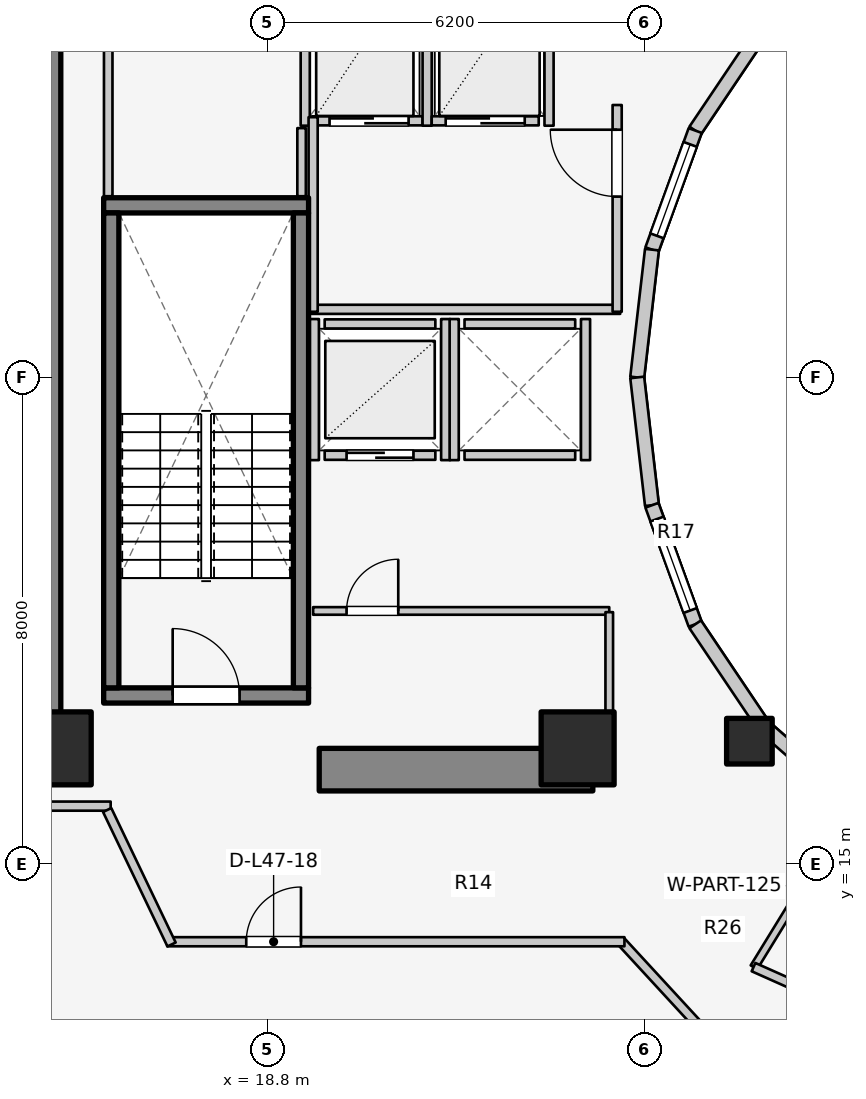
"""IFC4 building model, lengths in metres.
Left out: names, types, materials, properties, quantities, classifications, styles, units other than length and angle.
Written with IfcOpenShell. Run it as: python <this file> out.ifc"""

import sys

from ifc_helpers import new_model, si_unit, direction, frame, frame_2d, origin, origin_2d, place, context, subcontext, project, spatial, rectangle, extrude, element, fill, save


model = new_model("IFC4")
c1 = context("Model", 3, precision=1e-05, world=origin(), true_north=direction((0.0, 1.0)))
c2 = subcontext(c1, "Body", "Model", "MODEL_VIEW")
j1 = project(units=[si_unit("LENGTHUNIT", "METRE"), si_unit("PLANEANGLEUNIT", "RADIAN")], contexts=[c1])
p1 = place(None, origin())
s1 = spatial("IfcSite", under=j1, at=p1, CompositionType="ELEMENT")
p2 = place(p1, origin())
s2 = spatial("IfcBuilding", under=s1, at=p2, CompositionType="ELEMENT")
p3 = place(p2, frame((0.0, 0.0, 156.0)))
s3 = spatial("IfcBuildingStorey", under=s2, at=p3, CompositionType="ELEMENT", Elevation=156.0)
p4 = place(p3, frame((15.05, 17.05, 0.0), z_axis=(0.0, 0.0, 1.0), x_axis=(0.0, 1.0, 0.0)))
e1 = element("IfcWall", 1, at=p4, inside=s3, PredefinedType="SHEAR", context=c2, shape_type="SweptSolid", body=[
    extrude(rectangle(XDim=12.8, YDim=0.7, at=frame_2d((6.4, 0.0))), origin(), (0.0, 0.0, 1.0), 3.1),
])
p5 = place(p3, frame((19.65, 16.55, 0.0), z_axis=(0.0, 0.0, 1.0), x_axis=(1.0, 0.0, 0.0)))
e2 = element("IfcWall", 2, at=p5, inside=s3, PredefinedType="SHEAR", context=c2, shape_type="SweptSolid", body=[
    extrude(rectangle(XDim=4.5, YDim=0.7, at=frame_2d((2.25, 0.0))), origin(), (0.0, 0.0, 1.0), 3.1),
])
p6 = place(p3, frame((16.105, 17.77, 0.0), z_axis=(0.0, 0.0, 1.0), x_axis=(1.0, 0.0, 0.0)))
e3 = element("IfcWall", 3, at=p6, inside=s3, PredefinedType="SOLIDWALL", context=c2, shape_type="SweptSolid", body=[
    extrude(rectangle(XDim=3.37, YDim=0.25, at=frame_2d((1.685, 0.0))), origin(), (0.0, 0.0, 1.0), 3.1),
])
p7 = place(p6, frame((1.135, 0.0, 0.0)))
e4 = element("IfcOpeningElement", 4, at=p7, cuts=e3, PredefinedType="OPENING", context=c2, shape_type="SweptSolid", body=[
    extrude(rectangle(XDim=1.1, YDim=2.1, at=frame_2d((0.55, 1.05))), frame((0.0, 0.135, 0.0), z_axis=(0.0, -1.0, 0.0), x_axis=(1.0, 0.0, 0.0)), (0.0, 0.0, 1.0), 0.27),
])
p8 = place(p3, frame((16.105, 25.83, 0.0), z_axis=(0.0, 0.0, 1.0), x_axis=(1.0, 0.0, 0.0)))
e5 = element("IfcWall", 5, at=p8, inside=s3, PredefinedType="SOLIDWALL", context=c2, shape_type="SweptSolid", body=[
    extrude(rectangle(XDim=3.37, YDim=0.25, at=frame_2d((1.685, 0.0))), origin(), (0.0, 0.0, 1.0), 3.1),
])
for number, where, z_axis, x_axis in (
    (6, (16.23, 17.895, 0.0), (0.0, 0.0, 1.0), (0.0, 1.0, 0.0)),
    (7, (19.35, 17.895, 0.0), (0.0, 0.0, 1.0), (0.0, 1.0, 0.0)),
):
    element("IfcWall", number, at=place(p3, frame(where, z_axis=z_axis, x_axis=x_axis)), inside=s3, PredefinedType="SOLIDWALL", context=c2, shape_type="SweptSolid", body=[
        extrude(rectangle(XDim=7.81, YDim=0.25, at=frame_2d((3.905, 0.0))), origin(), (0.0, 0.0, 1.0), 3.1),
    ])
for number, where, z_axis, x_axis in (
    (8, (15.3, 16.9, 0.0), (0.0, 0.0, 1.0), (1.0, 0.0, 0.0)),
    (9, (23.9, 16.9, 0.0), (0.0, 0.0, 1.0), (1.0, 0.0, 0.0)),
):
    element("IfcColumn", number, at=place(p3, frame(where, z_axis=z_axis, x_axis=x_axis)), inside=s3, PredefinedType="COLUMN", context=c2, shape_type="SweptSolid", body=[
        extrude(rectangle(XDim=1.2, YDim=1.2, at=origin_2d()), origin(), (0.0, 0.0, 1.0), 3.1),
    ])
p9 = place(p3, frame((26.725, 17.018, 0.0), z_axis=(0.0, 0.0, 1.0), x_axis=(1.0, 0.0, 0.0)))
e10 = element("IfcColumn", 10, at=p9, inside=s3, PredefinedType="COLUMN", context=c2, shape_type="SweptSolid", body=[
    extrude(rectangle(XDim=0.75, YDim=0.75, at=origin_2d()), origin(), (0.0, 0.0, 1.0), 3.1),
])
p10 = place(p3, frame((26.965, 28.742, 0.0), z_axis=(0.0, 0.0, 1.0), x_axis=(-0.558197800898, -0.829707909492, 0.0)))
e11 = element("IfcWall", 11, at=p10, inside=s3, PredefinedType="STANDARD", context=c2, shape_type="SweptSolid", body=[
    extrude(rectangle(XDim=2.027, YDim=0.23, at=frame_2d((1.013, 0.0))), origin(), (0.0, 0.0, 1.0), 2.16),
])
p11 = place(p3, frame((25.834, 27.06, 0.0), z_axis=(0.0, 0.0, 1.0), x_axis=(-0.341423187295, -0.93990968033, 0.0)))
e12 = element("IfcWall", 12, at=p11, inside=s3, PredefinedType="STANDARD", context=c2, shape_type="SweptSolid", body=[
    extrude(rectangle(XDim=2.084, YDim=0.23, at=frame_2d((1.042, 0.0))), origin(), (0.0, 0.0, 1.0), 2.84),
])
p12 = place(p11, frame((0.242, 0.0, 0.85)))
e13 = element("IfcOpeningElement", 13, at=p12, cuts=e12, PredefinedType="OPENING", context=c2, shape_type="SweptSolid", body=[
    extrude(rectangle(XDim=1.6, YDim=1.65, at=frame_2d((0.8, 0.825))), frame((0.0, 0.125, 0.0), z_axis=(0.0, -1.0, 0.0), x_axis=(1.0, 0.0, 0.0)), (0.0, 0.0, 1.0), 0.25),
])
for number, where, z_axis, x_axis in (
    (14, (25.123, 25.102, 0.0), (0.0, 0.0, 1.0), (-0.115, -0.993, 0.0)),
    (15, (24.88, 23.0, 0.0), (0.0, 0.0, 1.0), (0.115, -0.993, 0.0)),
):
    element("IfcWall", number, at=place(p3, frame(where, z_axis=z_axis, x_axis=x_axis)), inside=s3, PredefinedType="STANDARD", context=c2, shape_type="SweptSolid", body=[
        extrude(rectangle(XDim=2.115, YDim=0.23, at=frame_2d((1.058, 0.0))), origin(), (0.0, 0.0, 1.0), 2.84),
    ])
p13 = place(p3, frame((25.123, 20.898, 0.0), z_axis=(0.0, 0.0, 1.0), x_axis=(0.341423187295, -0.93990968033, 0.0)))
e16 = element("IfcWall", 16, at=p13, inside=s3, PredefinedType="STANDARD", context=c2, shape_type="SweptSolid", body=[
    extrude(rectangle(XDim=2.084, YDim=0.23, at=frame_2d((1.042, 0.0))), origin(), (0.0, 0.0, 1.0), 2.84),
])
p14 = place(p13, frame((0.242, 0.0, 0.85)))
e17 = element("IfcOpeningElement", 17, at=p14, cuts=e16, PredefinedType="OPENING", context=c2, shape_type="SweptSolid", body=[
    extrude(rectangle(XDim=1.6, YDim=1.65, at=frame_2d((0.8, 0.825))), frame((0.0, 0.125, 0.0), z_axis=(0.0, -1.0, 0.0), x_axis=(1.0, 0.0, 0.0)), (0.0, 0.0, 1.0), 0.25),
])
p15 = place(p3, frame((25.834, 18.94, 0.0), z_axis=(0.0, 0.0, 1.0), x_axis=(0.558197800898, -0.829707909492, 0.0)))
e18 = element("IfcWall", 18, at=p15, inside=s3, PredefinedType="STANDARD", context=c2, shape_type="SweptSolid", body=[
    extrude(rectangle(XDim=2.027, YDim=0.23, at=frame_2d((1.013, 0.0))), origin(), (0.0, 0.0, 1.0), 2.16),
])
p16 = place(p3, frame((26.965, 17.258, 0.0), z_axis=(0.0, 0.0, 1.0), x_axis=(0.752576694707, -0.658504607869, 0.0)))
e19 = element("IfcWall", 19, at=p16, inside=s3, PredefinedType="STANDARD", context=c2, shape_type="SweptSolid", body=[
    extrude(rectangle(XDim=1.959, YDim=0.23, at=frame_2d((0.98, 0.0))), origin(), (0.0, 0.0, 1.0), 2.16),
])
p17 = place(p3, frame((12.381, 13.757, 0.0), z_axis=(0.0, 0.0, 1.0), x_axis=(0.790185650662, -0.612867552973, 0.0)))
e20 = element("IfcWall", 20, at=p17, inside=s3, PredefinedType="STANDARD", context=c2, shape_type="SweptSolid", body=[
    extrude(rectangle(XDim=4.239, YDim=0.26, at=frame_2d((2.12, 0.0))), origin(), (0.0, 0.0, 1.0), 2.85),
])
p18 = place(p17, frame((1.37, 0.0, 0.75)))
e21 = element("IfcOpeningElement", 21, at=p18, cuts=e20, PredefinedType="OPENING", context=c2, shape_type="SweptSolid", body=[
    extrude(rectangle(XDim=1.5, YDim=1.6, at=frame_2d((0.75, 0.8))), frame((0.0, 0.14, 0.0), z_axis=(0.0, -1.0, 0.0), x_axis=(1.0, 0.0, 0.0)), (0.0, 0.0, 1.0), 0.28),
])
p19 = place(p3, frame((19.74, 21.72, 0.0), z_axis=(0.0, 0.0, 1.0), x_axis=(1.0, 0.0, 0.0)))
e22 = element("IfcWall", 22, at=p19, inside=s3, PredefinedType="SOLIDWALL", context=c2, shape_type="SweptSolid", body=[
    extrude(rectangle(XDim=1.82, YDim=0.15, at=frame_2d((0.91, 0.0))), origin(), (0.0, 0.0, 1.0), 2.855),
])
p20 = place(p19, frame((0.36, 0.0, 0.0)))
e23 = element("IfcOpeningElement", 23, at=p20, cuts=e22, PredefinedType="OPENING", context=c2, shape_type="SweptSolid", body=[
    extrude(rectangle(XDim=1.1, YDim=2.1, at=frame_2d((0.55, 1.05))), frame((0.0, 0.085, 0.0), z_axis=(0.0, -1.0, 0.0), x_axis=(1.0, 0.0, 0.0)), (0.0, 0.0, 1.0), 0.17),
])
p21 = place(p3, frame((19.74, 23.88, 0.0), z_axis=(0.0, 0.0, 1.0), x_axis=(1.0, 0.0, 0.0)))
e24 = element("IfcWall", 24, at=p21, inside=s3, PredefinedType="SOLIDWALL", context=c2, shape_type="SweptSolid", body=[
    extrude(rectangle(XDim=1.82, YDim=0.15, at=frame_2d((0.91, 0.0))), origin(), (0.0, 0.0, 1.0), 2.855),
])
for number, where, z_axis, x_axis in (
    (25, (19.57, 21.64, 0.0), (0.0, 0.0, 1.0), (0.0, 1.0, 0.0)),
    (26, (21.73, 21.64, 0.0), (0.0, 0.0, 1.0), (0.0, 1.0, 0.0)),
):
    element("IfcWall", number, at=place(p3, frame(where, z_axis=z_axis, x_axis=x_axis)), inside=s3, PredefinedType="SOLIDWALL", context=c2, shape_type="SweptSolid", body=[
        extrude(rectangle(XDim=2.32, YDim=0.15, at=frame_2d((1.16, 0.0))), origin(), (0.0, 0.0, 1.0), 2.855),
    ])
for number, where, z_axis, x_axis in (
    (27, (22.04, 21.72, 0.0), (0.0, 0.0, 1.0), (1.0, 0.0, 0.0)),
    (28, (22.04, 23.88, 0.0), (0.0, 0.0, 1.0), (1.0, 0.0, 0.0)),
):
    element("IfcWall", number, at=place(p3, frame(where, z_axis=z_axis, x_axis=x_axis)), inside=s3, PredefinedType="SOLIDWALL", context=c2, shape_type="SweptSolid", body=[
        extrude(rectangle(XDim=1.82, YDim=0.15, at=frame_2d((0.91, 0.0))), origin(), (0.0, 0.0, 1.0), 2.12),
    ])
p22 = place(p3, frame((21.87, 21.64, 0.0), z_axis=(0.0, 0.0, 1.0), x_axis=(0.0, 1.0, 0.0)))
e29 = element("IfcWall", 29, at=p22, inside=s3, PredefinedType="SOLIDWALL", context=c2, shape_type="SweptSolid", body=[
    extrude(rectangle(XDim=2.32, YDim=0.15, at=frame_2d((1.16, 0.0))), origin(), (0.0, 0.0, 1.0), 2.855),
])
p23 = place(p3, frame((24.03, 21.64, 0.0), z_axis=(0.0, 0.0, 1.0), x_axis=(0.0, 1.0, 0.0)))
e30 = element("IfcWall", 30, at=p23, inside=s3, PredefinedType="SOLIDWALL", context=c2, shape_type="SweptSolid", body=[
    extrude(rectangle(XDim=2.32, YDim=0.15, at=frame_2d((1.16, 0.0))), origin(), (0.0, 0.0, 1.0), 2.12),
])
p24 = place(p3, frame((19.59, 27.22, 0.0), z_axis=(0.0, 0.0, 1.0), x_axis=(1.0, 0.0, 0.0)))
e31 = element("IfcWall", 31, at=p24, inside=s3, PredefinedType="SOLIDWALL", context=c2, shape_type="SweptSolid", body=[
    extrude(rectangle(XDim=1.76, YDim=0.15, at=frame_2d((0.88, 0.0))), origin(), (0.0, 0.0, 1.0), 2.855),
])
p25 = place(p24, frame((0.23, 0.0, 0.0)))
e32 = element("IfcOpeningElement", 32, at=p25, cuts=e31, PredefinedType="OPENING", context=c2, shape_type="SweptSolid", body=[
    extrude(rectangle(XDim=1.3, YDim=2.1, at=frame_2d((0.65, 1.05))), frame((0.0, 0.085, 0.0), z_axis=(0.0, -1.0, 0.0), x_axis=(1.0, 0.0, 0.0)), (0.0, 0.0, 1.0), 0.17),
])
for number, where, z_axis, x_axis in (
    (33, (19.42, 27.14, 0.0), (0.0, 0.0, 1.0), (0.0, 1.0, 0.0)),
    (34, (21.425, 27.14, 0.0), (0.0, 0.0, 1.0), (0.0, 1.0, 0.0)),
):
    element("IfcWall", number, at=place(p3, frame(where, z_axis=z_axis, x_axis=x_axis)), inside=s3, PredefinedType="SOLIDWALL", context=c2, shape_type="SweptSolid", body=[
        extrude(rectangle(XDim=2.72, YDim=0.15, at=frame_2d((1.36, 0.0))), origin(), (0.0, 0.0, 1.0), 2.855),
    ])
p26 = place(p3, frame((21.5, 27.22, 0.0), z_axis=(0.0, 0.0, 1.0), x_axis=(1.0, 0.0, 0.0)))
e35 = element("IfcWall", 35, at=p26, inside=s3, PredefinedType="SOLIDWALL", context=c2, shape_type="SweptSolid", body=[
    extrude(rectangle(XDim=1.76, YDim=0.15, at=frame_2d((0.88, 0.0))), origin(), (0.0, 0.0, 1.0), 2.855),
])
p27 = place(p26, frame((0.23, 0.0, 0.0)))
e36 = element("IfcOpeningElement", 36, at=p27, cuts=e35, PredefinedType="OPENING", context=c2, shape_type="SweptSolid", body=[
    extrude(rectangle(XDim=1.3, YDim=2.1, at=frame_2d((0.65, 1.05))), frame((0.0, 0.085, 0.0), z_axis=(0.0, -1.0, 0.0), x_axis=(1.0, 0.0, 0.0)), (0.0, 0.0, 1.0), 0.17),
])
p28 = place(p3, frame((23.43, 27.14, 0.0), z_axis=(0.0, 0.0, 1.0), x_axis=(0.0, 1.0, 0.0)))
e37 = element("IfcWall", 37, at=p28, inside=s3, PredefinedType="SOLIDWALL", context=c2, shape_type="SweptSolid", body=[
    extrude(rectangle(XDim=2.72, YDim=0.15, at=frame_2d((1.36, 0.0))), origin(), (0.0, 0.0, 1.0), 2.855),
])
p29 = place(p3, frame((19.52, 24.12, 0.0), z_axis=(0.0, 0.0, 1.0), x_axis=(1.0, 0.0, 0.0)))
e38 = element("IfcWall", 38, at=p29, inside=s3, PredefinedType="PARTITIONING", context=c2, shape_type="SweptSolid", body=[
    extrude(rectangle(XDim=5.08, YDim=0.15, at=frame_2d((2.54, 0.0))), origin(), (0.0, 0.0, 1.0), 2.12),
])
p30 = place(p3, frame((19.55, 24.08, 0.0), z_axis=(0.0, 0.0, 1.0), x_axis=(0.0, 1.0, 0.0)))
e39 = element("IfcWall", 39, at=p30, inside=s3, PredefinedType="PARTITIONING", context=c2, shape_type="SweptSolid", body=[
    extrude(rectangle(XDim=3.2, YDim=0.15, at=frame_2d((1.6, 0.0))), origin(), (0.0, 0.0, 1.0), 2.855),
])
p31 = place(p3, frame((24.55, 24.08, 0.0), z_axis=(0.0, 0.0, 1.0), x_axis=(0.0, 1.0, 0.0)))
e40 = element("IfcWall", 40, at=p31, inside=s3, PredefinedType="PARTITIONING", context=c2, shape_type="SweptSolid", body=[
    extrude(rectangle(XDim=3.4, YDim=0.15, at=frame_2d((1.7, 0.0))), origin(), (0.0, 0.0, 1.0), 2.855),
])
p32 = place(p31, frame((1.894, 0.0, 0.0)))
e41 = element("IfcOpeningElement", 41, at=p32, cuts=e40, PredefinedType="OPENING", context=c2, shape_type="SweptSolid", body=[
    extrude(rectangle(XDim=1.1, YDim=2.1, at=frame_2d((0.55, 1.05))), frame((0.0, 0.085, 0.0), z_axis=(0.0, -1.0, 0.0), x_axis=(1.0, 0.0, 0.0)), (0.0, 0.0, 1.0), 0.17),
])
p33 = place(p3, frame((19.55, 19.16, 0.0), z_axis=(0.0, 0.0, 1.0), x_axis=(1.0, 0.0, 0.0)))
e42 = element("IfcWall", 42, at=p33, inside=s3, PredefinedType="PARTITIONING", context=c2, shape_type="SweptSolid", body=[
    extrude(rectangle(XDim=4.87, YDim=0.125, at=frame_2d((2.435, 0.0))), origin(), (0.0, 0.0, 1.0), 2.12),
])
p34 = place(p33, frame((0.55, 0.0, 0.0)))
e43 = element("IfcOpeningElement", 43, at=p34, cuts=e42, PredefinedType="OPENING", context=c2, shape_type="SweptSolid", body=[
    extrude(rectangle(XDim=0.85, YDim=2.05, at=frame_2d((0.425, 1.025))), frame((0.0, 0.073, 0.0), z_axis=(0.0, -1.0, 0.0), x_axis=(1.0, 0.0, 0.0)), (0.0, 0.0, 1.0), 0.145),
])
p35 = place(p3, frame((24.42, 17.1, 0.0), z_axis=(0.0, 0.0, 1.0), x_axis=(0.0, 1.0, 0.0)))
e44 = element("IfcWall", 44, at=p35, inside=s3, PredefinedType="PARTITIONING", context=c2, shape_type="SweptSolid", body=[
    extrude(rectangle(XDim=2.04, YDim=0.125, at=frame_2d((1.02, 0.0))), origin(), (0.0, 0.0, 1.0), 2.232),
])
p36 = place(p3, frame((16.18, 25.98, 0.0), z_axis=(0.0, 0.0, 1.0), x_axis=(0.0, 1.0, 0.0)))
e45 = element("IfcWall", 45, at=p36, inside=s3, PredefinedType="PLUMBINGWALL", context=c2, shape_type="SweptSolid", body=[
    extrude(rectangle(XDim=3.88, YDim=0.14, at=frame_2d((1.94, 0.0))), origin(), (0.0, 0.0, 1.0), 2.855),
])
p37 = place(p3, frame((19.36, 25.98, 0.0), z_axis=(0.0, 0.0, 1.0), x_axis=(0.0, 1.0, 0.0)))
e46 = element("IfcWall", 46, at=p37, inside=s3, PredefinedType="PLUMBINGWALL", context=c2, shape_type="SweptSolid", body=[
    extrude(rectangle(XDim=1.12, YDim=0.14, at=frame_2d((0.56, 0.0))), origin(), (0.0, 0.0, 1.0), 2.855),
])
p38 = place(p3, frame((10.96, 15.95, 0.0), z_axis=(0.0, 0.0, 1.0), x_axis=(1.0, 0.0, 0.0)))
e47 = element("IfcWall", 47, at=p38, inside=s3, PredefinedType="PARTITIONING", context=c2, shape_type="SweptSolid", body=[
    extrude(rectangle(XDim=5.26, YDim=0.15, at=frame_2d((2.63, 0.0))), origin(), (0.0, 0.0, 1.0), 2.22),
])
p39 = place(p3, frame((26.072, 12.144, 0.0), z_axis=(0.0, 0.0, 1.0), x_axis=(-0.677579737957, 0.735449317567, 0.0)))
e48 = element("IfcWall", 48, at=p39, inside=s3, PredefinedType="PARTITIONING", context=c2, shape_type="SweptSolid", body=[
    extrude(rectangle(XDim=2.173, YDim=0.15, at=frame_2d((1.086, 0.0))), origin(), (0.0, 0.0, 1.0), 2.299),
])
p40 = place(p3, frame((17.15, 13.72, 0.0), z_axis=(0.0, 0.0, 1.0), x_axis=(1.0, 0.0, 0.0)))
e49 = element("IfcWall", 49, at=p40, inside=s3, PredefinedType="PARTITIONING", context=c2, shape_type="SweptSolid", body=[
    extrude(rectangle(XDim=7.52, YDim=0.15, at=frame_2d((3.76, 0.0))), origin(), (0.0, 0.0, 1.0), 2.299),
])
p41 = place(p40, frame((1.3, 0.0, 0.0)))
e50 = element("IfcOpeningElement", 50, at=p41, cuts=e49, PredefinedType="OPENING", context=c2, shape_type="SweptSolid", body=[
    extrude(rectangle(XDim=0.9, YDim=2.1, at=frame_2d((0.45, 1.05))), frame((0.0, 0.085, 0.0), z_axis=(0.0, -1.0, 0.0), x_axis=(1.0, 0.0, 0.0)), (0.0, 0.0, 1.0), 0.17),
])
p42 = place(p3, frame((17.222, 13.675, 0.0), z_axis=(0.0, 0.0, 1.0), x_axis=(-0.431973389813, 0.901886351207, 0.0)))
e51 = element("IfcWall", 51, at=p42, inside=s3, PredefinedType="PARTITIONING", context=c2, shape_type="SweptSolid", body=[
    extrude(rectangle(XDim=2.452, YDim=0.15, at=frame_2d((1.226, 0.0))), origin(), (0.0, 0.0, 1.0), 2.855),
])
p43 = place(p3, frame((28.45, 15.985, 0.0), z_axis=(0.0, 0.0, 1.0), x_axis=(-0.523587550846, -0.851971875474, 0.0)))
e52 = element("IfcWall", 52, at=p43, inside=s3, PredefinedType="PARTITIONING", context=c2, shape_type="SweptSolid", body=[
    extrude(rectangle(XDim=3.153, YDim=0.125, at=frame_2d((1.577, 0.0))), origin(), (0.0, 0.0, 1.0), 2.299),
])
p44 = place(p3, frame((26.793, 13.303, 0.0), z_axis=(0.0, 0.0, 1.0), x_axis=(0.913145536541, -0.407633694749, 0.0)))
e53 = element("IfcWall", 53, at=p44, inside=s3, PredefinedType="PARTITIONING", context=c2, shape_type="SweptSolid", body=[
    extrude(rectangle(XDim=2.756, YDim=0.15, at=frame_2d((1.378, 0.0))), origin(), (0.0, 0.0, 1.0), 2.299),
])
p45 = place(p12, origin())
e54 = element("IfcWindow", 54, at=p45, inside=s3, PartitioningType="SINGLE_PANEL", PredefinedType="WINDOW", context=c2, shape_type="SweptSolid", body=[
    extrude(rectangle(XDim=1.6, YDim=1.65, at=frame_2d((0.8, 0.825))), frame((0.0, 0.03, 0.0), z_axis=(0.0, -1.0, 0.0), x_axis=(1.0, 0.0, 0.0)), (0.0, 0.0, 1.0), 0.06),
])
fill(e13, e54)
p46 = place(p14, origin())
e55 = element("IfcWindow", 55, at=p46, inside=s3, PartitioningType="SINGLE_PANEL", PredefinedType="WINDOW", context=c2, shape_type="SweptSolid", body=[
    extrude(rectangle(XDim=1.6, YDim=1.65, at=frame_2d((0.8, 0.825))), frame((0.0, 0.03, 0.0), z_axis=(0.0, -1.0, 0.0), x_axis=(1.0, 0.0, 0.0)), (0.0, 0.0, 1.0), 0.06),
])
fill(e17, e55)
p47 = place(p7, origin())
e56 = element("IfcDoor", 56, at=p47, inside=s3, OperationType="SINGLE_SWING_LEFT", PredefinedType="DOOR", context=c2, shape_type="SweptSolid", body=[
    extrude(rectangle(XDim=1.1, YDim=2.1, at=frame_2d((0.55, 1.05))), frame((0.0, 0.025, 0.0), z_axis=(0.0, -1.0, 0.0), x_axis=(1.0, 0.0, 0.0)), (0.0, 0.0, 1.0), 0.05),
])
fill(e4, e56)
p48 = place(p20, origin())
e57 = element("IfcDoor", 57, at=p48, inside=s3, OperationType="DOUBLE_DOOR_SLIDING", PredefinedType="DOOR", context=c2, shape_type="SweptSolid", body=[
    extrude(rectangle(XDim=1.1, YDim=2.1, at=frame_2d((0.55, 1.05))), frame((0.0, 0.025, 0.0), z_axis=(0.0, -1.0, 0.0), x_axis=(1.0, 0.0, 0.0)), (0.0, 0.0, 1.0), 0.05),
])
fill(e23, e57)
p49 = place(p25, origin())
e58 = element("IfcDoor", 58, at=p49, inside=s3, OperationType="DOUBLE_DOOR_SLIDING", PredefinedType="DOOR", context=c2, shape_type="SweptSolid", body=[
    extrude(rectangle(XDim=1.3, YDim=2.1, at=frame_2d((0.65, 1.05))), frame((0.0, 0.025, 0.0), z_axis=(0.0, -1.0, 0.0), x_axis=(1.0, 0.0, 0.0)), (0.0, 0.0, 1.0), 0.05),
])
fill(e32, e58)
p50 = place(p27, origin())
e59 = element("IfcDoor", 59, at=p50, inside=s3, OperationType="DOUBLE_DOOR_SLIDING", PredefinedType="DOOR", context=c2, shape_type="SweptSolid", body=[
    extrude(rectangle(XDim=1.3, YDim=2.1, at=frame_2d((0.65, 1.05))), frame((0.0, 0.025, 0.0), z_axis=(0.0, -1.0, 0.0), x_axis=(1.0, 0.0, 0.0)), (0.0, 0.0, 1.0), 0.05),
])
fill(e36, e59)
p51 = place(p32, origin())
e60 = element("IfcDoor", 60, at=p51, inside=s3, OperationType="SINGLE_SWING_RIGHT", PredefinedType="DOOR", context=c2, shape_type="SweptSolid", body=[
    extrude(rectangle(XDim=1.1, YDim=2.1, at=frame_2d((0.55, 1.05))), frame((0.0, 0.025, 0.0), z_axis=(0.0, -1.0, 0.0), x_axis=(1.0, 0.0, 0.0)), (0.0, 0.0, 1.0), 0.05),
])
fill(e41, e60)
p52 = place(p34, origin())
e61 = element("IfcDoor", 61, at=p52, inside=s3, OperationType="SINGLE_SWING_RIGHT", PredefinedType="DOOR", context=c2, shape_type="SweptSolid", body=[
    extrude(rectangle(XDim=0.85, YDim=2.05, at=frame_2d((0.425, 1.025))), frame((0.0, 0.025, 0.0), z_axis=(0.0, -1.0, 0.0), x_axis=(1.0, 0.0, 0.0)), (0.0, 0.0, 1.0), 0.05),
])
fill(e43, e61)
p53 = place(p41, origin())
e62 = element("IfcDoor", 62, at=p53, inside=s3, OperationType="SINGLE_SWING_RIGHT", PredefinedType="DOOR", context=c2, shape_type="SweptSolid", body=[
    extrude(rectangle(XDim=0.9, YDim=2.1, at=frame_2d((0.45, 1.05))), frame((0.0, 0.025, 0.0), z_axis=(0.0, -1.0, 0.0), x_axis=(1.0, 0.0, 0.0)), (0.0, 0.0, 1.0), 0.05),
])
fill(e50, e62)
save(model, sys.argv[1])
